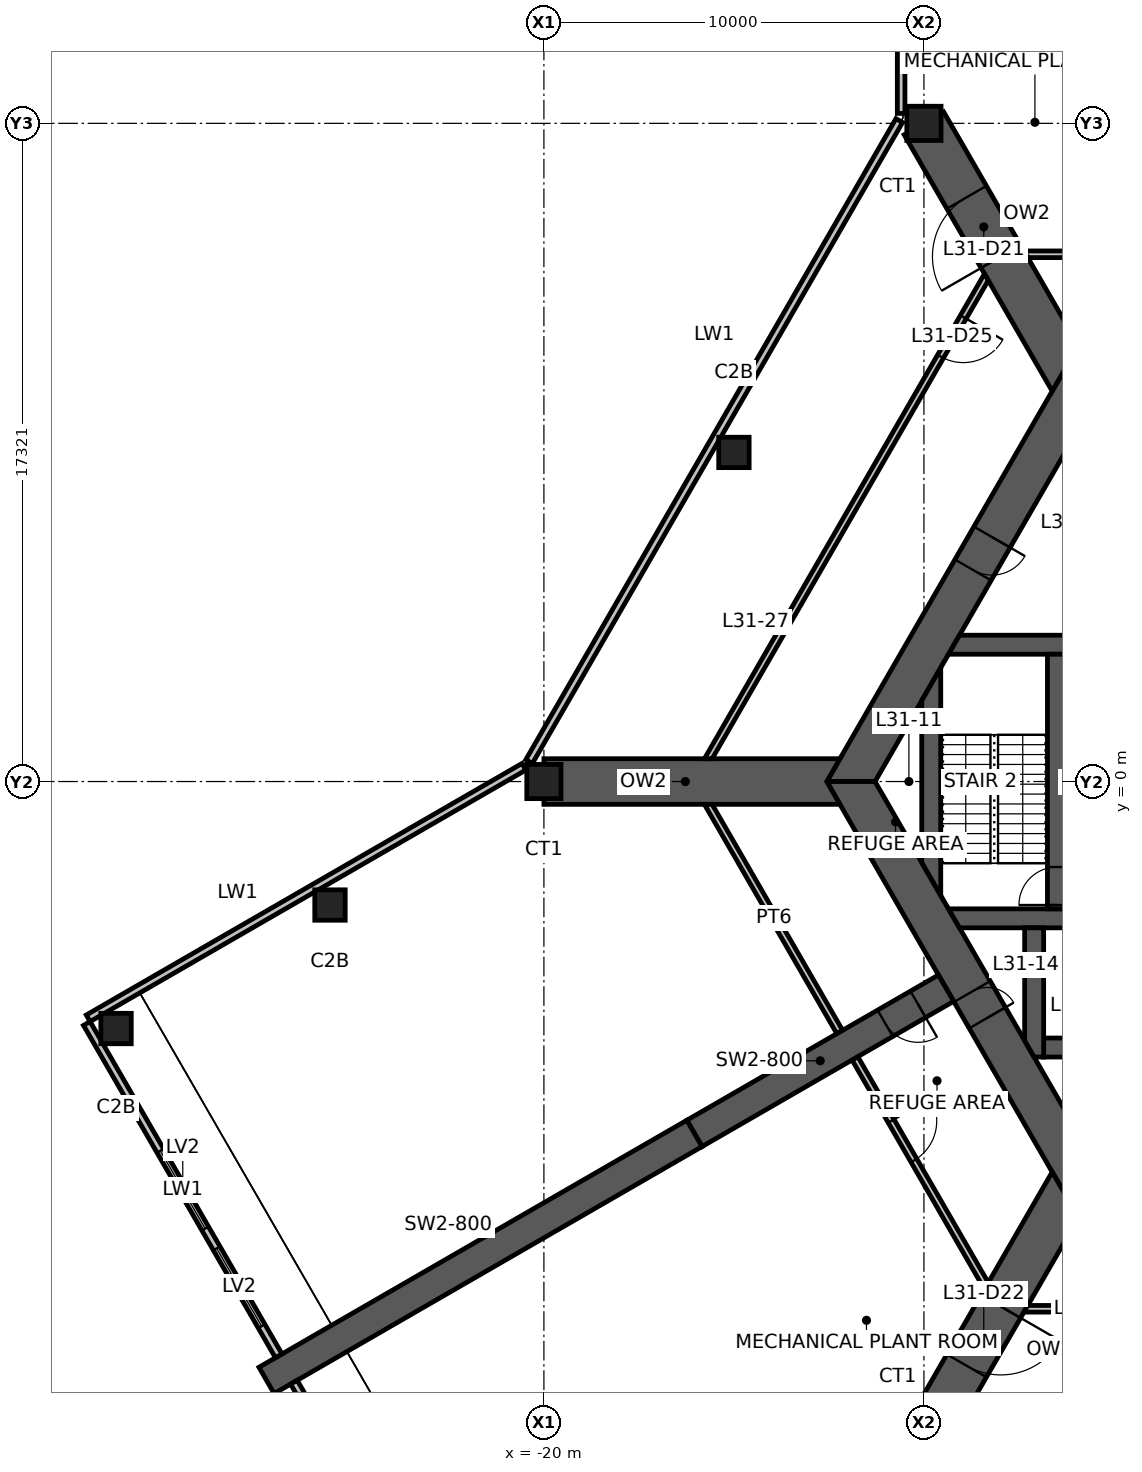
"""IFC4 building model, lengths in metres.
Left out: names, types, materials, properties, quantities, classifications, styles, units other than length and angle.
Written with IfcOpenShell. Run it as: python <this file> out.ifc"""

import sys

from ifc_helpers import new_model, si_unit, direction, frame, frame_2d, origin, origin_2d, place, context, subcontext, project, spatial, polyline, rectangle, hollow_rectangle, outline, extrude, element, fill, save


model = new_model("IFC4")
c1 = context("Model", 3, precision=1e-05, world=origin(), true_north=direction((0.0, 1.0)))
c2 = subcontext(c1, "Body", "Model", "MODEL_VIEW")
j1 = project(units=[si_unit("LENGTHUNIT", "METRE"), si_unit("PLANEANGLEUNIT", "RADIAN")], contexts=[c1])
p1 = place(None, origin())
s1 = spatial("IfcSite", under=j1, at=p1, CompositionType="ELEMENT")
p2 = place(p1, origin())
s2 = spatial("IfcBuilding", under=s1, at=p2, CompositionType="ELEMENT")
p3 = place(p2, frame((0.0, 0.0, 123.6)))
s3 = spatial("IfcBuildingStorey", under=s2, at=p3, CompositionType="ELEMENT", Elevation=123.6)
for number, where, z_axis, x_axis in (
    (1, (-10.0, 17.321, 0.0), (0.0, 0.0, 1.0), (1.0, 0.0, 0.0)),
    (2, (-20.0, 0.0, 0.0), (0.0, 0.0, 1.0), (1.0, 0.0, 0.0)),
):
    element("IfcColumn", number, at=place(p3, frame(where, z_axis=z_axis, x_axis=x_axis)), inside=s3, PredefinedType="COLUMN", context=c2, shape_type="SweptSolid", body=[
        extrude(hollow_rectangle(XDim=0.9, YDim=0.9, WallThickness=0.07, at=origin_2d()), origin(), (0.0, 0.0, 1.0), 5.0),
    ])
for number, where, z_axis, x_axis in (
    (3, (-15.0, 8.66, 0.0), (0.0, 0.0, 1.0), (1.0, 0.0, 0.0)),
    (4, (-25.629, -3.25, 0.0), (0.0, 0.0, 1.0), (1.0, 0.0, 0.0)),
    (5, (-31.258, -6.5, 0.0), (0.0, 0.0, 1.0), (1.0, 0.0, 0.0)),
):
    element("IfcColumn", number, at=place(p3, frame(where, z_axis=z_axis, x_axis=x_axis)), inside=s3, PredefinedType="COLUMN", context=c2, shape_type="SweptSolid", body=[
        extrude(hollow_rectangle(XDim=0.8, YDim=0.8, WallThickness=0.045, at=origin_2d()), origin(), (0.0, 0.0, 1.0), 5.0),
    ])
p4 = place(p3, frame((-5.961, 10.325, 0.0), z_axis=(0.0, 0.0, 1.0), x_axis=(-0.500004296715, -0.866022923061, 0.0)))
e6 = element("IfcWall", 6, at=p4, inside=s3, PredefinedType="SHEAR", context=c2, shape_type="SweptSolid", body=[
    extrude(outline(polyline([(-0.318, -0.55), (4.494, -0.55), (5.494, -0.55), (12.24, -0.55), (11.605, 0.55), (5.494, 0.55), (4.494, 0.55), (0.318, 0.55), (-0.318, -0.55)])), origin(), (0.0, 0.0, 1.0), 5.0),
])
p5 = place(p4, frame((4.494, 0.0, 0.0)))
e7 = element("IfcOpeningElement", 7, at=p5, cuts=e6, PredefinedType="OPENING", context=c2, shape_type="SweptSolid", body=[
    extrude(rectangle(XDim=1.0, YDim=2.1, at=frame_2d((0.5, 1.05))), frame((0.0, 0.56, 0.0), z_axis=(0.0, -1.0, 0.0), x_axis=(1.0, 0.0, 0.0)), (0.0, 0.0, 1.0), 1.12),
])
p6 = place(p3, frame((-11.922, 0.0, 0.0), z_axis=(0.0, 0.0, 1.0), x_axis=(0.500004296715, -0.866022923061, 0.0)))
e8 = element("IfcWall", 8, at=p6, inside=s3, PredefinedType="SHEAR", context=c2, shape_type="SweptSolid", body=[
    extrude(outline(polyline([(-0.318, -0.55), (6.381, -0.55), (7.181, -0.55), (12.24, -0.55), (11.605, 0.55), (7.181, 0.55), (6.381, 0.55), (0.318, 0.55), (-0.318, -0.55)])), origin(), (0.0, 0.0, 1.0), 5.0),
])
p7 = place(p6, frame((6.381, 0.0, 0.0)))
e9 = element("IfcOpeningElement", 9, at=p7, cuts=e8, PredefinedType="OPENING", context=c2, shape_type="SweptSolid", body=[
    extrude(rectangle(XDim=0.8, YDim=2.1, at=frame_2d((0.4, 1.05))), frame((0.0, 0.56, 0.0), z_axis=(0.0, -1.0, 0.0), x_axis=(1.0, 0.0, 0.0)), (0.0, 0.0, 1.0), 1.12),
])
p8 = place(p3, frame((-9.418, -5.438, 0.0), z_axis=(0.0, 0.0, 1.0), x_axis=(-0.866029782078, -0.499992416496, 0.0)))
e10 = element("IfcWall", 10, at=p8, inside=s3, PredefinedType="SHEAR", context=c2, shape_type="SweptSolid", body=[
    extrude(rectangle(XDim=7.646, YDim=0.8, at=frame_2d((3.823, 0.0))), origin(), (0.0, 0.0, 1.0), 5.0),
])
p9 = place(p8, frame((0.85, 0.0, 0.0)))
e11 = element("IfcOpeningElement", 11, at=p9, cuts=e10, PredefinedType="OPENING", context=c2, shape_type="SweptSolid", body=[
    extrude(rectangle(XDim=1.0, YDim=2.1, at=frame_2d((0.5, 1.05))), frame((0.0, 0.41, 0.0), z_axis=(0.0, -1.0, 0.0), x_axis=(1.0, 0.0, 0.0)), (0.0, 0.0, 1.0), 0.82),
])
p10 = place(p3, frame((-16.039, -9.26, 0.0), z_axis=(0.0, 0.0, 1.0), x_axis=(-0.866024837091, -0.50000098154, 0.0)))
e12 = element("IfcWall", 12, at=p10, inside=s3, PredefinedType="SHEAR", context=c2, shape_type="SweptSolid", body=[
    extrude(rectangle(XDim=13.0, YDim=0.8, at=frame_2d((6.5, 0.0))), origin(), (0.0, 0.0, 1.0), 5.0),
])
p11 = place(p3, frame((-6.279, 10.875, -1.15), z_axis=(0.0, 0.0, 1.0), x_axis=(-0.50000923905, 0.866020069551, 0.0)))
e13 = element("IfcWall", 13, at=p11, inside=s3, PredefinedType="SHEAR", context=c2, shape_type="SweptSolid", body=[
    extrude(outline(polyline([(-0.346, -0.6), (3.395, -0.6), (5.195, -0.6), (7.443, -0.6), (7.443, 0.6), (5.195, 0.6), (3.395, 0.6), (-0.346, 0.6), (0.0, 0.0), (-0.346, -0.6)])), origin(), (0.0, 0.0, 1.0), 6.15),
])
p12 = place(p11, frame((3.395, 0.0, 1.15)))
e14 = element("IfcOpeningElement", 14, at=p12, cuts=e13, PredefinedType="OPENING", context=c2, shape_type="SweptSolid", body=[
    extrude(rectangle(XDim=1.8, YDim=2.4, at=frame_2d((0.9, 1.2))), frame((0.0, 0.61, 0.0), z_axis=(0.0, -1.0, 0.0), x_axis=(1.0, 0.0, 0.0)), (0.0, 0.0, 1.0), 1.22),
])
p13 = place(p3, frame((-12.557, 0.0, -1.15), z_axis=(0.0, 0.0, 1.0), x_axis=(-1.0, 0.0, 0.0)))
e15 = element("IfcWall", 15, at=p13, inside=s3, PredefinedType="SHEAR", context=c2, shape_type="SweptSolid", body=[
    extrude(outline(polyline([(-0.346, -0.6), (7.443, -0.6), (7.443, 0.6), (-0.346, 0.6), (0.0, 0.0), (-0.346, -0.6)])), origin(), (0.0, 0.0, 1.0), 6.15),
])
p14 = place(p3, frame((-6.279, -10.875, -1.15), z_axis=(0.0, 0.0, 1.0), x_axis=(-0.50000923905, -0.866020069551, 0.0)))
e16 = element("IfcWall", 16, at=p14, inside=s3, PredefinedType="SHEAR", context=c2, shape_type="SweptSolid", body=[
    extrude(outline(polyline([(-0.346, -0.6), (3.395, -0.6), (5.195, -0.6), (7.443, -0.6), (7.443, 0.6), (5.195, 0.6), (3.395, 0.6), (-0.346, 0.6), (0.0, 0.0), (-0.346, -0.6)])), origin(), (0.0, 0.0, 1.0), 6.15),
])
p15 = place(p14, frame((3.395, 0.0, 1.15)))
e17 = element("IfcOpeningElement", 17, at=p15, cuts=e16, PredefinedType="OPENING", context=c2, shape_type="SweptSolid", body=[
    extrude(rectangle(XDim=1.8, YDim=2.4, at=frame_2d((0.9, 1.2))), frame((0.0, 0.61, 0.0), z_axis=(0.0, -1.0, 0.0), x_axis=(1.0, 0.0, 0.0)), (0.0, 0.0, 1.0), 1.22),
])
p16 = place(p3, frame((-10.6, 30.821, 0.0), z_axis=(0.0, 0.0, 1.0), x_axis=(0.0, -1.0, 0.0)))
e18 = element("IfcWall", 18, at=p16, inside=s3, PredefinedType="ELEMENTEDWALL", context=c2, shape_type="SweptSolid", body=[
    extrude(rectangle(XDim=13.239, YDim=0.2, at=frame_2d((6.62, 0.0))), origin(), (0.0, 0.0, 1.0), 5.0),
])
p17 = place(p3, frame((-10.65, 17.395, 0.0), z_axis=(0.0, 0.0, 1.0), x_axis=(-0.499999841607, -0.866025495233, 0.0)))
e19 = element("IfcWall", 19, at=p17, inside=s3, PredefinedType="ELEMENTEDWALL", context=c2, shape_type="SweptSolid", body=[
    extrude(rectangle(XDim=19.479, YDim=0.2, at=frame_2d((9.739, 0.0))), origin(), (0.0, 0.0, 1.0), 5.0),
])
p18 = place(p3, frame((-20.526, 0.389, 0.0), z_axis=(0.0, 0.0, 1.0), x_axis=(-0.86602620781, -0.499998607384, 0.0)))
e20 = element("IfcWall", 20, at=p18, inside=s3, PredefinedType="ELEMENTEDWALL", context=c2, shape_type="SweptSolid", body=[
    extrude(rectangle(XDim=13.239, YDim=0.2, at=frame_2d((6.62, 0.0))), origin(), (0.0, 0.0, 1.0), 5.0),
])
p19 = place(p3, frame((-32.028, -6.367, 0.0), z_axis=(0.0, 0.0, 1.0), x_axis=(0.499986799974, -0.866033024689, 0.0)))
e21 = element("IfcWall", 21, at=p19, inside=s3, PredefinedType="ELEMENTEDWALL", context=c2, shape_type="SweptSolid", body=[
    extrude(rectangle(XDim=10.1, YDim=0.2, at=frame_2d((5.05, 0.0))), origin(), (0.0, 0.0, 1.0), 5.0),
])
p20 = place(p19, frame((3.867, 0.0, 0.6)))
e22 = element("IfcOpeningElement", 22, at=p20, cuts=e21, PredefinedType="OPENING", context=c2, shape_type="SweptSolid", body=[
    extrude(rectangle(XDim=2.367, YDim=3.6, at=frame_2d((1.183, 1.8))), frame((0.0, 0.11, 0.0), z_axis=(0.0, -1.0, 0.0), x_axis=(1.0, 0.0, 0.0)), (0.0, 0.0, 1.0), 0.22),
])
p21 = place(p19, frame((6.833, 0.0, 0.6)))
e23 = element("IfcOpeningElement", 23, at=p21, cuts=e21, PredefinedType="OPENING", context=c2, shape_type="SweptSolid", body=[
    extrude(rectangle(XDim=2.367, YDim=3.6, at=frame_2d((1.183, 1.8))), frame((0.0, 0.11, 0.0), z_axis=(0.0, -1.0, 0.0), x_axis=(1.0, 0.0, 0.0)), (0.0, 0.0, 1.0), 0.22),
])
p22 = place(p3, frame((-26.578, -15.807, 0.0), z_axis=(0.0, 0.0, 1.0), x_axis=(0.500004929441, -0.866022557752, 0.0)))
e24 = element("IfcWall", 24, at=p22, inside=s3, PredefinedType="ELEMENTEDWALL", context=c2, shape_type="SweptSolid", body=[
    extrude(rectangle(XDim=10.1, YDim=0.2, at=frame_2d((5.05, 0.0))), origin(), (0.0, 0.0, 1.0), 5.0),
])
p23 = place(p22, frame((0.9, 0.0, 0.6)))
e25 = element("IfcOpeningElement", 25, at=p23, cuts=e24, PredefinedType="OPENING", context=c2, shape_type="SweptSolid", body=[
    extrude(rectangle(XDim=2.367, YDim=3.6, at=frame_2d((1.183, 1.8))), frame((0.0, 0.11, 0.0), z_axis=(0.0, -1.0, 0.0), x_axis=(1.0, 0.0, 0.0)), (0.0, 0.0, 1.0), 0.22),
])
p24 = place(p22, frame((3.867, 0.0, 0.6)))
e26 = element("IfcOpeningElement", 26, at=p24, cuts=e24, PredefinedType="OPENING", context=c2, shape_type="SweptSolid", body=[
    extrude(rectangle(XDim=2.367, YDim=3.6, at=frame_2d((1.183, 1.8))), frame((0.0, 0.11, 0.0), z_axis=(0.0, -1.0, 0.0), x_axis=(1.0, 0.0, 0.0)), (0.0, 0.0, 1.0), 0.22),
])
p25 = place(p3, frame((-9.209, 3.6, 0.0), z_axis=(0.0, 0.0, 1.0), x_axis=(1.0, 0.0, 0.0)))
e27 = element("IfcWall", 27, at=p25, inside=s3, PredefinedType="SHEAR", context=c2, shape_type="SweptSolid", body=[
    extrude(outline(polyline([(-0.144, -0.25), (3.209, -0.25), (4.209, -0.25), (7.859, -0.25), (7.859, 0.25), (4.209, 0.25), (3.209, 0.25), (0.144, 0.25), (-0.144, -0.25)])), origin(), (0.0, 0.0, 1.0), 5.0),
])
p26 = place(p25, frame((3.209, 0.0, 0.0)))
e28 = element("IfcOpeningElement", 28, at=p26, cuts=e27, PredefinedType="OPENING", context=c2, shape_type="SweptSolid", body=[
    extrude(rectangle(XDim=1.0, YDim=2.1, at=frame_2d((0.5, 1.05))), frame((0.0, 0.26, 0.0), z_axis=(0.0, -1.0, 0.0), x_axis=(1.0, 0.0, 0.0)), (0.0, 0.0, 1.0), 0.52),
])
p27 = place(p3, frame((-9.209, -3.6, 0.0), z_axis=(0.0, 0.0, 1.0), x_axis=(1.0, 0.0, 0.0)))
e29 = element("IfcWall", 29, at=p27, inside=s3, PredefinedType="SHEAR", context=c2, shape_type="SweptSolid", body=[
    extrude(outline(polyline([(0.144, -0.25), (3.059, -0.25), (4.359, -0.25), (7.859, -0.25), (7.859, 0.25), (4.359, 0.25), (3.059, 0.25), (-0.144, 0.25), (0.144, -0.25)])), origin(), (0.0, 0.0, 1.0), 5.0),
])
p28 = place(p27, frame((3.059, 0.0, 0.0)))
e30 = element("IfcOpeningElement", 30, at=p28, cuts=e29, PredefinedType="OPENING", context=c2, shape_type="SweptSolid", body=[
    extrude(rectangle(XDim=1.3, YDim=2.1, at=frame_2d((0.65, 1.05))), frame((0.0, 0.26, 0.0), z_axis=(0.0, -1.0, 0.0), x_axis=(1.0, 0.0, 0.0)), (0.0, 0.0, 1.0), 0.52),
])
p29 = place(p3, frame((-6.5, -3.35, 0.0), z_axis=(0.0, 0.0, 1.0), x_axis=(0.0, 1.0, 0.0)))
e31 = element("IfcWall", 31, at=p29, inside=s3, PredefinedType="SHEAR", context=c2, shape_type="SweptSolid", body=[
    extrude(rectangle(XDim=6.7, YDim=0.5, at=frame_2d((3.35, 0.0))), origin(), (0.0, 0.0, 1.0), 5.0),
])
p30 = place(p29, frame((0.1, 0.0, 0.0)))
e32 = element("IfcOpeningElement", 32, at=p30, cuts=e31, PredefinedType="OPENING", context=c2, shape_type="SweptSolid", body=[
    extrude(rectangle(XDim=1.0, YDim=2.1, at=frame_2d((0.5, 1.05))), frame((0.0, 0.26, 0.0), z_axis=(0.0, -1.0, 0.0), x_axis=(1.0, 0.0, 0.0)), (0.0, 0.0, 1.0), 0.52),
])
p31 = place(p3, frame((-6.85, -7.0, 0.0), z_axis=(0.0, 0.0, 1.0), x_axis=(1.0, 0.0, 0.0)))
e33 = element("IfcWall", 33, at=p31, inside=s3, PredefinedType="SHEAR", context=c2, shape_type="SweptSolid", body=[
    extrude(rectangle(XDim=2.1, YDim=0.5, at=frame_2d((1.05, 0.0))), origin(), (0.0, 0.0, 1.0), 5.0),
])
p32 = place(p3, frame((-7.1, -3.85, 0.0), z_axis=(0.0, 0.0, 1.0), x_axis=(0.0, -1.0, 0.0)))
e34 = element("IfcWall", 34, at=p32, inside=s3, PredefinedType="SHEAR", context=c2, shape_type="SweptSolid", body=[
    extrude(outline(polyline([(0.0, -0.25), (2.969, -0.25), (3.4, 0.0), (3.4, 0.25), (0.0, 0.25), (0.0, -0.25)])), origin(), (0.0, 0.0, 1.0), 5.0),
])
p33 = place(p3, frame((-9.808, -2.562, 0.0), z_axis=(0.0, 0.0, 1.0), x_axis=(0.0, 1.0, 0.0)))
e35 = element("IfcWall", 35, at=p33, inside=s3, PredefinedType="SHEAR", context=c2, shape_type="SweptSolid", body=[
    extrude(outline(polyline([(-0.433, -0.25), (5.558, -0.25), (4.691, 0.25), (0.433, 0.25), (-0.433, -0.25)])), origin(), (0.0, 0.0, 1.0), 5.0),
])
p34 = place(p3, frame((-0.405, 13.875, 0.0), z_axis=(0.0, 0.0, 1.0), x_axis=(-1.0, 0.0, 0.0)))
e36 = element("IfcWall", 36, at=p34, inside=s3, PredefinedType="PARTITIONING", context=c2, shape_type="SweptSolid", body=[
    extrude(outline(polyline([(0.0, -0.087), (1.9, -0.087), (3.1, -0.087), (6.963, -0.087), (6.862, 0.087), (3.1, 0.087), (1.9, 0.087), (0.0, 0.087), (0.0, -0.087)])), origin(), (0.0, 0.0, 1.0), 4.8),
])
p35 = place(p34, frame((1.9, 0.0, 0.0)))
e37 = element("IfcOpeningElement", 37, at=p35, cuts=e36, PredefinedType="OPENING", context=c2, shape_type="SweptSolid", body=[
    extrude(rectangle(XDim=1.2, YDim=2.1, at=frame_2d((0.6, 1.05))), frame((0.0, 0.098, 0.0), z_axis=(0.0, -1.0, 0.0), x_axis=(1.0, 0.0, 0.0)), (0.0, 0.0, 1.0), 0.195),
])
p36 = place(p3, frame((-8.357, 13.275, 0.0), z_axis=(0.0, 0.0, 1.0), x_axis=(-0.500003545903, -0.866023356546, 0.0)))
e38 = element("IfcWall", 38, at=p36, inside=s3, PredefinedType="PARTITIONING", context=c2, shape_type="SweptSolid", body=[
    extrude(outline(polyline([(-0.051, -0.087), (1.213, -0.087), (2.413, -0.087), (14.686, -0.087), (14.585, 0.087), (2.413, 0.087), (1.213, 0.087), (0.051, 0.087), (-0.051, -0.087)])), origin(), (0.0, 0.0, 1.0), 4.8),
])
p37 = place(p36, frame((1.213, 0.0, 0.0)))
e39 = element("IfcOpeningElement", 39, at=p37, cuts=e38, PredefinedType="OPENING", context=c2, shape_type="SweptSolid", body=[
    extrude(rectangle(XDim=1.2, YDim=2.1, at=frame_2d((0.6, 1.05))), frame((0.0, 0.098, 0.0), z_axis=(0.0, -1.0, 0.0), x_axis=(1.0, 0.0, 0.0)), (0.0, 0.0, 1.0), 0.195),
])
p38 = place(p3, frame((-15.675, -0.6, 0.0), z_axis=(0.0, 0.0, 1.0), x_axis=(0.500005739714, -0.866022089933, 0.0)))
e40 = element("IfcWall", 40, at=p38, inside=s3, PredefinedType="PARTITIONING", context=c2, shape_type="SweptSolid", body=[
    extrude(outline(polyline([(-0.051, -0.087), (6.913, -0.087), (6.913, 0.087), (0.051, 0.087), (-0.051, -0.087)])), origin(), (0.0, 0.0, 1.0), 4.8),
])
p39 = place(p3, frame((-11.814, -7.288, 0.0), z_axis=(0.0, 0.0, 1.0), x_axis=(0.500005739714, -0.866022089933, 0.0)))
e41 = element("IfcWall", 41, at=p39, inside=s3, PredefinedType="PARTITIONING", context=c2, shape_type="SweptSolid", body=[
    extrude(outline(polyline([(0.0, -0.087), (1.9, -0.087), (3.1, -0.087), (6.964, -0.087), (6.863, 0.087), (3.1, 0.087), (1.9, 0.087), (0.0, 0.087), (0.0, -0.087)])), origin(), (0.0, 0.0, 1.0), 4.8),
])
p40 = place(p39, frame((1.9, 0.0, 0.0)))
e42 = element("IfcOpeningElement", 42, at=p40, cuts=e41, PredefinedType="OPENING", context=c2, shape_type="SweptSolid", body=[
    extrude(rectangle(XDim=1.2, YDim=2.1, at=frame_2d((0.6, 1.05))), frame((0.0, 0.098, 0.0), z_axis=(0.0, -1.0, 0.0), x_axis=(1.0, 0.0, 0.0)), (0.0, 0.0, 1.0), 0.195),
])
p41 = place(p3, frame((-7.318, -13.875, 0.0), z_axis=(0.0, 0.0, 1.0), x_axis=(1.0, 0.0, 0.0)))
e43 = element("IfcWall", 43, at=p41, inside=s3, PredefinedType="PARTITIONING", context=c2, shape_type="SweptSolid", body=[
    extrude(outline(polyline([(-0.051, -0.087), (1.213, -0.087), (2.413, -0.087), (14.686, -0.087), (14.585, 0.087), (2.413, 0.087), (1.213, 0.087), (0.051, 0.087), (-0.051, -0.087)])), origin(), (0.0, 0.0, 1.0), 4.8),
])
p42 = place(p41, frame((1.213, 0.0, 0.0)))
e44 = element("IfcOpeningElement", 44, at=p42, cuts=e43, PredefinedType="OPENING", context=c2, shape_type="SweptSolid", body=[
    extrude(rectangle(XDim=1.2, YDim=2.1, at=frame_2d((0.6, 1.05))), frame((0.0, 0.098, 0.0), z_axis=(0.0, -1.0, 0.0), x_axis=(1.0, 0.0, 0.0)), (0.0, 0.0, 1.0), 0.195),
])
p43 = place(p20, origin())
e45 = element("IfcWindow", 45, at=p43, inside=s3, PartitioningType="SINGLE_PANEL", PredefinedType="USERDEFINED", context=c2, shape_type="SweptSolid", body=[
    extrude(rectangle(XDim=2.367, YDim=3.6, at=frame_2d((1.183, 1.8))), frame((0.0, 0.03, 0.0), z_axis=(0.0, -1.0, 0.0), x_axis=(1.0, 0.0, 0.0)), (0.0, 0.0, 1.0), 0.06),
])
fill(e22, e45)
p44 = place(p21, origin())
e46 = element("IfcWindow", 46, at=p44, inside=s3, PartitioningType="SINGLE_PANEL", PredefinedType="USERDEFINED", context=c2, shape_type="SweptSolid", body=[
    extrude(rectangle(XDim=2.367, YDim=3.6, at=frame_2d((1.183, 1.8))), frame((0.0, 0.03, 0.0), z_axis=(0.0, -1.0, 0.0), x_axis=(1.0, 0.0, 0.0)), (0.0, 0.0, 1.0), 0.06),
])
fill(e23, e46)
p45 = place(p7, origin())
e47 = element("IfcDoor", 47, at=p45, inside=s3, OperationType="SINGLE_SWING_RIGHT", PredefinedType="DOOR", context=c2, shape_type="SweptSolid", body=[
    extrude(rectangle(XDim=0.8, YDim=2.1, at=frame_2d((0.4, 1.05))), frame((0.0, 0.025, 0.0), z_axis=(0.0, -1.0, 0.0), x_axis=(1.0, 0.0, 0.0)), (0.0, 0.0, 1.0), 0.05),
])
fill(e9, e47)
p46 = place(p5, origin())
e48 = element("IfcDoor", 48, at=p46, inside=s3, OperationType="SINGLE_SWING_LEFT", PredefinedType="DOOR", context=c2, shape_type="SweptSolid", body=[
    extrude(rectangle(XDim=1.0, YDim=2.1, at=frame_2d((0.5, 1.05))), frame((0.0, 0.025, 0.0), z_axis=(0.0, -1.0, 0.0), x_axis=(1.0, 0.0, 0.0)), (0.0, 0.0, 1.0), 0.05),
])
fill(e7, e48)
p47 = place(p30, origin())
e49 = element("IfcDoor", 49, at=p47, inside=s3, OperationType="SINGLE_SWING_LEFT", PredefinedType="DOOR", context=c2, shape_type="SweptSolid", body=[
    extrude(rectangle(XDim=1.0, YDim=2.1, at=frame_2d((0.5, 1.05))), frame((0.0, 0.025, 0.0), z_axis=(0.0, -1.0, 0.0), x_axis=(1.0, 0.0, 0.0)), (0.0, 0.0, 1.0), 0.05),
])
fill(e32, e49)
p48 = place(p9, origin())
e50 = element("IfcDoor", 50, at=p48, inside=s3, OperationType="SINGLE_SWING_LEFT", PredefinedType="DOOR", context=c2, shape_type="SweptSolid", body=[
    extrude(rectangle(XDim=1.0, YDim=2.1, at=frame_2d((0.5, 1.05))), frame((0.0, 0.025, 0.0), z_axis=(0.0, -1.0, 0.0), x_axis=(1.0, 0.0, 0.0)), (0.0, 0.0, 1.0), 0.05),
])
fill(e11, e50)
p49 = place(p12, origin())
e51 = element("IfcDoor", 51, at=p49, inside=s3, OperationType="DOUBLE_DOOR_SINGLE_SWING", PredefinedType="DOOR", context=c2, shape_type="SweptSolid", body=[
    extrude(rectangle(XDim=1.8, YDim=2.4, at=frame_2d((0.9, 1.2))), frame((0.0, 0.025, 0.0), z_axis=(0.0, -1.0, 0.0), x_axis=(1.0, 0.0, 0.0)), (0.0, 0.0, 1.0), 0.05),
])
fill(e14, e51)
p50 = place(p15, origin())
e52 = element("IfcDoor", 52, at=p50, inside=s3, OperationType="DOUBLE_DOOR_SINGLE_SWING", PredefinedType="DOOR", context=c2, shape_type="SweptSolid", body=[
    extrude(rectangle(XDim=1.8, YDim=2.4, at=frame_2d((0.9, 1.2))), frame((0.0, 0.025, 0.0), z_axis=(0.0, -1.0, 0.0), x_axis=(1.0, 0.0, 0.0)), (0.0, 0.0, 1.0), 0.05),
])
fill(e17, e52)
p51 = place(p37, origin())
e53 = element("IfcDoor", 53, at=p51, inside=s3, OperationType="DOUBLE_DOOR_SINGLE_SWING", PredefinedType="DOOR", context=c2, shape_type="SweptSolid", body=[
    extrude(rectangle(XDim=1.2, YDim=2.1, at=frame_2d((0.6, 1.05))), frame((0.0, 0.025, 0.0), z_axis=(0.0, -1.0, 0.0), x_axis=(1.0, 0.0, 0.0)), (0.0, 0.0, 1.0), 0.05),
])
fill(e39, e53)
p52 = place(p40, origin())
e54 = element("IfcDoor", 54, at=p52, inside=s3, OperationType="DOUBLE_DOOR_SINGLE_SWING", PredefinedType="DOOR", context=c2, shape_type="SweptSolid", body=[
    extrude(rectangle(XDim=1.2, YDim=2.1, at=frame_2d((0.6, 1.05))), frame((0.0, 0.025, 0.0), z_axis=(0.0, -1.0, 0.0), x_axis=(1.0, 0.0, 0.0)), (0.0, 0.0, 1.0), 0.05),
])
fill(e42, e54)
save(model, sys.argv[1])
